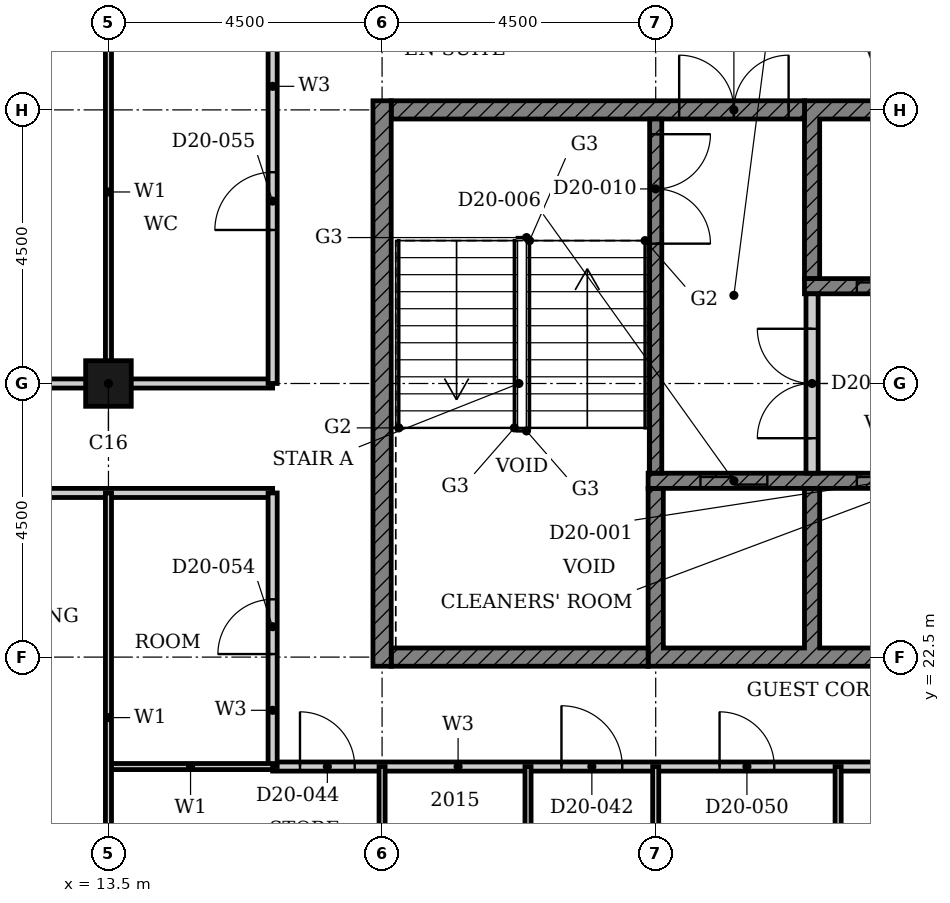
"""IFC4 building model, lengths in metres.
Left out: names, types, materials, properties, quantities, classifications, styles, units other than length and angle.
Written with IfcOpenShell. Run it as: python <this file> out.ifc"""

import sys

from ifc_helpers import new_model, si_unit, direction, frame, frame_2d, origin, origin_2d, place, context, subcontext, project, spatial, polyline, rectangle, hollow_rectangle, outline, extrude, element, fill, save


model = new_model("IFC4")
c1 = context("Model", 3, precision=1e-05, world=origin(), true_north=direction((0.0, 1.0)))
c2 = subcontext(c1, "Body", "Model", "MODEL_VIEW")
j1 = project(units=[si_unit("LENGTHUNIT", "METRE"), si_unit("PLANEANGLEUNIT", "RADIAN")], contexts=[c1])
p1 = place(None, origin())
s1 = spatial("IfcSite", under=j1, at=p1, CompositionType="ELEMENT")
p2 = place(p1, origin())
s2 = spatial("IfcBuilding", under=s1, at=p2, CompositionType="ELEMENT")
p3 = place(p2, frame((0.0, 0.0, 85.2)))
s3 = spatial("IfcBuildingStorey", under=s2, at=p3, CompositionType="ELEMENT", Elevation=85.2)
p4 = place(p3, frame((13.5, 27.0, 0.0), z_axis=(0.0, 0.0, 1.0), x_axis=(1.0, 0.0, 0.0)))
e1 = element("IfcColumn", 1, at=p4, inside=s3, PredefinedType="COLUMN", context=c2, shape_type="SweptSolid", body=[
    extrude(hollow_rectangle(XDim=0.75, YDim=0.75, WallThickness=0.024, at=origin_2d()), origin(), (0.0, 0.0, 1.0), 3.6),
])
p5 = place(p3, origin())
e2 = element("IfcWall", 2, at=p5, inside=s3, PredefinedType="SHEAR", context=c2, shape_type="SweptSolid", body=[
    extrude(outline(polyline([(22.375, 22.35), (38.053, 22.35), (38.053, 25.275), (37.803, 25.275), (37.803, 22.65), (35.482, 22.65), (35.482, 25.275), (35.232, 25.275), (35.232, 22.65), (32.911, 22.65), (32.911, 25.275), (32.661, 25.275), (32.661, 22.65), (30.339, 22.65), (30.339, 25.275), (30.089, 25.275), (30.089, 22.65), (27.768, 22.65), (27.768, 25.275), (27.518, 25.275), (27.518, 22.65), (25.197, 22.65), (25.197, 25.275), (24.947, 25.275), (24.947, 22.65), (22.625, 22.65), (22.625, 25.275), (22.375, 25.275), (22.375, 22.35)])), origin(), (0.0, 0.0, 1.0), 3.3),
])
p6 = place(p3, origin())
e3 = element("IfcWall", 3, at=p6, inside=s3, PredefinedType="SHEAR", context=c2, shape_type="SweptSolid", body=[
    extrude(outline(polyline([(24.947, 28.725), (25.197, 28.725), (25.197, 31.35), (27.518, 31.35), (27.518, 28.725), (27.768, 28.725), (27.768, 31.35), (30.089, 31.35), (30.089, 28.725), (30.339, 28.725), (30.339, 31.35), (32.661, 31.35), (32.661, 28.725), (32.911, 28.725), (32.911, 31.35), (35.232, 31.35), (35.232, 28.725), (35.482, 28.725), (35.482, 31.35), (37.803, 31.35), (37.803, 28.725), (38.053, 28.725), (38.053, 31.35), (40.375, 31.35), (40.375, 28.725), (40.625, 28.725), (40.625, 31.65), (24.947, 31.65), (24.947, 28.725)])), origin(), (0.0, 0.0, 1.0), 3.3),
])
p7 = place(p3, frame((18.15, 22.5, 0.0), z_axis=(0.0, 0.0, 1.0), x_axis=(1.0, 0.0, 0.0)))
e4 = element("IfcWall", 4, at=p7, inside=s3, PredefinedType="SHEAR", context=c2, shape_type="SweptSolid", body=[
    extrude(rectangle(XDim=4.225, YDim=0.3, at=frame_2d((2.113, 0.0))), origin(), (0.0, 0.0, 1.0), 3.3),
])
p8 = place(p3, frame((18.15, 31.5, 0.0), z_axis=(0.0, 0.0, 1.0), x_axis=(1.0, 0.0, 0.0)))
e5 = element("IfcWall", 5, at=p8, inside=s3, PredefinedType="SHEAR", context=c2, shape_type="SweptSolid", body=[
    extrude(rectangle(XDim=6.797, YDim=0.3, at=frame_2d((3.398, 0.0))), origin(), (0.0, 0.0, 1.0), 3.3),
])
p9 = place(p8, frame((4.736, 0.0, 0.0)))
e6 = element("IfcOpeningElement", 6, at=p9, cuts=e5, PredefinedType="OPENING", context=c2, shape_type="SweptSolid", body=[
    extrude(rectangle(XDim=1.8, YDim=2.1, at=frame_2d((0.9, 1.05))), frame((0.0, 0.16, 0.0), z_axis=(0.0, -1.0, 0.0), x_axis=(1.0, 0.0, 0.0)), (0.0, 0.0, 1.0), 0.32),
])
p10 = place(p3, frame((18.0, 22.35, 0.0), z_axis=(0.0, 0.0, 1.0), x_axis=(0.0, 1.0, 0.0)))
e7 = element("IfcWall", 7, at=p10, inside=s3, PredefinedType="SHEAR", context=c2, shape_type="SweptSolid", body=[
    extrude(rectangle(XDim=9.3, YDim=0.3, at=frame_2d((4.65, 0.0))), origin(), (0.0, 0.0, 1.0), 3.3),
])
p11 = place(p3, frame((22.375, 25.4, 0.0), z_axis=(0.0, 0.0, 1.0), x_axis=(1.0, 0.0, 0.0)))
e8 = element("IfcWall", 8, at=p11, inside=s3, PredefinedType="SHEAR", context=c2, shape_type="SweptSolid", body=[
    extrude(rectangle(XDim=15.678, YDim=0.25, at=frame_2d((7.839, 0.0))), origin(), (0.0, 0.0, 1.0), 3.3),
])
p12 = place(p11, frame((3.432, 0.0, 0.0)))
e9 = element("IfcOpeningElement", 9, at=p12, cuts=e8, PredefinedType="OPENING", context=c2, shape_type="SweptSolid", body=[
    extrude(rectangle(XDim=1.1, YDim=2.1, at=frame_2d((0.55, 1.05))), frame((0.0, 0.135, 0.0), z_axis=(0.0, -1.0, 0.0), x_axis=(1.0, 0.0, 0.0)), (0.0, 0.0, 1.0), 0.27),
])
p13 = place(p11, frame((11.146, 0.0, 0.0)))
e10 = element("IfcOpeningElement", 10, at=p13, cuts=e8, PredefinedType="OPENING", context=c2, shape_type="SweptSolid", body=[
    extrude(rectangle(XDim=1.1, YDim=2.1, at=frame_2d((0.55, 1.05))), frame((0.0, 0.135, 0.0), z_axis=(0.0, -1.0, 0.0), x_axis=(1.0, 0.0, 0.0)), (0.0, 0.0, 1.0), 0.27),
])
p14 = place(p11, frame((13.718, 0.0, 0.0)))
e11 = element("IfcOpeningElement", 11, at=p14, cuts=e8, PredefinedType="OPENING", context=c2, shape_type="SweptSolid", body=[
    extrude(rectangle(XDim=1.1, YDim=2.1, at=frame_2d((0.55, 1.05))), frame((0.0, 0.135, 0.0), z_axis=(0.0, -1.0, 0.0), x_axis=(1.0, 0.0, 0.0)), (0.0, 0.0, 1.0), 0.27),
])
p15 = place(p11, frame((0.861, 0.0, 0.0)))
e12 = element("IfcOpeningElement", 12, at=p15, cuts=e8, PredefinedType="OPENING", context=c2, shape_type="SweptSolid", body=[
    extrude(rectangle(XDim=1.1, YDim=2.1, at=frame_2d((0.55, 1.05))), frame((0.0, 0.135, 0.0), z_axis=(0.0, -1.0, 0.0), x_axis=(1.0, 0.0, 0.0)), (0.0, 0.0, 1.0), 0.27),
])
p16 = place(p3, frame((24.947, 28.6, 0.0), z_axis=(0.0, 0.0, 1.0), x_axis=(1.0, 0.0, 0.0)))
e13 = element("IfcWall", 13, at=p16, inside=s3, PredefinedType="SHEAR", context=c2, shape_type="SweptSolid", body=[
    extrude(rectangle(XDim=15.678, YDim=0.25, at=frame_2d((7.839, 0.0))), origin(), (0.0, 0.0, 1.0), 3.3),
])
p17 = place(p16, frame((0.861, 0.0, 0.0)))
e14 = element("IfcOpeningElement", 14, at=p17, cuts=e13, PredefinedType="OPENING", context=c2, shape_type="SweptSolid", body=[
    extrude(rectangle(XDim=1.1, YDim=2.1, at=frame_2d((0.55, 1.05))), frame((0.0, 0.135, 0.0), z_axis=(0.0, -1.0, 0.0), x_axis=(1.0, 0.0, 0.0)), (0.0, 0.0, 1.0), 0.27),
])
p18 = place(p16, frame((8.575, 0.0, 0.0)))
e15 = element("IfcOpeningElement", 15, at=p18, cuts=e13, PredefinedType="OPENING", context=c2, shape_type="SweptSolid", body=[
    extrude(rectangle(XDim=1.1, YDim=2.1, at=frame_2d((0.55, 1.05))), frame((0.0, 0.135, 0.0), z_axis=(0.0, -1.0, 0.0), x_axis=(1.0, 0.0, 0.0)), (0.0, 0.0, 1.0), 0.27),
])
p19 = place(p16, frame((13.718, 0.0, 0.0)))
e16 = element("IfcOpeningElement", 16, at=p19, cuts=e13, PredefinedType="OPENING", context=c2, shape_type="SweptSolid", body=[
    extrude(rectangle(XDim=1.1, YDim=2.1, at=frame_2d((0.55, 1.05))), frame((0.0, 0.135, 0.0), z_axis=(0.0, -1.0, 0.0), x_axis=(1.0, 0.0, 0.0)), (0.0, 0.0, 1.0), 0.27),
])
p20 = place(p3, frame((22.5, 31.35, 0.0), z_axis=(0.0, 0.0, 1.0), x_axis=(0.0, -1.0, 0.0)))
e17 = element("IfcWall", 17, at=p20, inside=s3, PredefinedType="SHEAR", context=c2, shape_type="SweptSolid", body=[
    extrude(rectangle(XDim=5.825, YDim=0.2, at=frame_2d((2.913, 0.0))), origin(), (0.0, 0.0, 1.0), 3.3),
])
p21 = place(p20, frame((0.25, 0.0, 0.0)))
e18 = element("IfcOpeningElement", 18, at=p21, cuts=e17, PredefinedType="OPENING", context=c2, shape_type="SweptSolid", body=[
    extrude(rectangle(XDim=1.8, YDim=2.1, at=frame_2d((0.9, 1.05))), frame((0.0, 0.11, 0.0), z_axis=(0.0, -1.0, 0.0), x_axis=(1.0, 0.0, 0.0)), (0.0, 0.0, 1.0), 0.22),
])
p22 = place(p3, frame((25.072, 25.525, 0.0), z_axis=(0.0, 0.0, 1.0), x_axis=(0.0, 1.0, 0.0)))
e19 = element("IfcWall", 19, at=p22, inside=s3, PredefinedType="PARTITIONING", context=c2, shape_type="SweptSolid", body=[
    extrude(rectangle(XDim=2.95, YDim=0.2, at=frame_2d((1.475, 0.0))), origin(), (0.0, 0.0, 1.0), 3.3),
])
p23 = place(p22, frame((0.575, 0.0, 0.0)))
e20 = element("IfcOpeningElement", 20, at=p23, cuts=e19, PredefinedType="OPENING", context=c2, shape_type="SweptSolid", body=[
    extrude(rectangle(XDim=1.8, YDim=2.1, at=frame_2d((0.9, 1.05))), frame((0.0, 0.11, 0.0), z_axis=(0.0, -1.0, 0.0), x_axis=(1.0, 0.0, 0.0)), (0.0, 0.0, 1.0), 0.22),
])
p24 = place(p3, frame((16.2, 20.7, 0.0), z_axis=(0.0, 0.0, 1.0), x_axis=(1.0, 0.0, 0.0)))
e21 = element("IfcWall", 21, at=p24, inside=s3, PredefinedType="PARTITIONING", context=c2, shape_type="SweptSolid", body=[
    extrude(rectangle(XDim=13.5, YDim=0.15, at=frame_2d((6.75, 0.0))), origin(), (0.0, 0.0, 1.0), 3.3),
])
p25 = place(p24, frame((4.75, 0.0, 0.0)))
e22 = element("IfcOpeningElement", 22, at=p25, cuts=e21, PredefinedType="OPENING", context=c2, shape_type="SweptSolid", body=[
    extrude(rectangle(XDim=1.0, YDim=2.1, at=frame_2d((0.5, 1.05))), frame((0.0, 0.085, 0.0), z_axis=(0.0, -1.0, 0.0), x_axis=(1.0, 0.0, 0.0)), (0.0, 0.0, 1.0), 0.17),
])
p26 = place(p24, frame((0.45, 0.0, 0.0)))
e23 = element("IfcOpeningElement", 23, at=p26, cuts=e21, PredefinedType="OPENING", context=c2, shape_type="SweptSolid", body=[
    extrude(rectangle(XDim=0.9, YDim=2.1, at=frame_2d((0.45, 1.05))), frame((0.0, 0.085, 0.0), z_axis=(0.0, -1.0, 0.0), x_axis=(1.0, 0.0, 0.0)), (0.0, 0.0, 1.0), 0.17),
])
p27 = place(p24, frame((7.35, 0.0, 0.0)))
e24 = element("IfcOpeningElement", 24, at=p27, cuts=e21, PredefinedType="OPENING", context=c2, shape_type="SweptSolid", body=[
    extrude(rectangle(XDim=0.9, YDim=2.1, at=frame_2d((0.45, 1.05))), frame((0.0, 0.085, 0.0), z_axis=(0.0, -1.0, 0.0), x_axis=(1.0, 0.0, 0.0)), (0.0, 0.0, 1.0), 0.17),
])
p28 = place(p24, frame((10.95, 0.0, 0.0)))
e25 = element("IfcOpeningElement", 25, at=p28, cuts=e21, PredefinedType="OPENING", context=c2, shape_type="SweptSolid", body=[
    extrude(rectangle(XDim=0.9, YDim=2.1, at=frame_2d((0.45, 1.05))), frame((0.0, 0.085, 0.0), z_axis=(0.0, -1.0, 0.0), x_axis=(1.0, 0.0, 0.0)), (0.0, 0.0, 1.0), 0.17),
])
p29 = place(p3, frame((4.5, 25.2, 0.0), z_axis=(0.0, 0.0, 1.0), x_axis=(1.0, 0.0, 0.0)))
e26 = element("IfcWall", 26, at=p29, inside=s3, PredefinedType="PARTITIONING", context=c2, shape_type="SweptSolid", body=[
    extrude(rectangle(XDim=11.7, YDim=0.15, at=frame_2d((5.85, 0.0))), origin(), (0.0, 0.0, 1.0), 3.3),
])
p30 = place(p29, frame((6.25, 0.0, 0.0)))
e27 = element("IfcOpeningElement", 27, at=p30, cuts=e26, PredefinedType="OPENING", context=c2, shape_type="SweptSolid", body=[
    extrude(rectangle(XDim=1.0, YDim=2.1, at=frame_2d((0.5, 1.05))), frame((0.0, 0.085, 0.0), z_axis=(0.0, -1.0, 0.0), x_axis=(1.0, 0.0, 0.0)), (0.0, 0.0, 1.0), 0.17),
])
p31 = place(p3, frame((4.5, 27.0, 0.0), z_axis=(0.0, 0.0, 1.0), x_axis=(1.0, 0.0, 0.0)))
e28 = element("IfcWall", 28, at=p31, inside=s3, PredefinedType="PARTITIONING", context=c2, shape_type="SweptSolid", body=[
    extrude(rectangle(XDim=11.7, YDim=0.15, at=frame_2d((5.85, 0.0))), origin(), (0.0, 0.0, 1.0), 2.58),
])
p32 = place(p31, frame((6.25, 0.0, 0.0)))
e29 = element("IfcOpeningElement", 29, at=p32, cuts=e28, PredefinedType="OPENING", context=c2, shape_type="SweptSolid", body=[
    extrude(rectangle(XDim=1.0, YDim=2.1, at=frame_2d((0.5, 1.05))), frame((0.0, 0.085, 0.0), z_axis=(0.0, -1.0, 0.0), x_axis=(1.0, 0.0, 0.0)), (0.0, 0.0, 1.0), 0.17),
])
p33 = place(p3, frame((16.2, 27.0, 0.0), z_axis=(0.0, 0.0, 1.0), x_axis=(0.0, 1.0, 0.0)))
e30 = element("IfcWall", 30, at=p33, inside=s3, PredefinedType="PARTITIONING", context=c2, shape_type="SweptSolid", body=[
    extrude(rectangle(XDim=6.3, YDim=0.15, at=frame_2d((3.15, 0.0))), origin(), (0.0, 0.0, 1.0), 3.3),
])
p34 = place(p33, frame((2.525, 0.0, 0.0)))
e31 = element("IfcOpeningElement", 31, at=p34, cuts=e30, PredefinedType="OPENING", context=c2, shape_type="SweptSolid", body=[
    extrude(rectangle(XDim=0.95, YDim=2.1, at=frame_2d((0.475, 1.05))), frame((0.0, 0.085, 0.0), z_axis=(0.0, -1.0, 0.0), x_axis=(1.0, 0.0, 0.0)), (0.0, 0.0, 1.0), 0.17),
])
p35 = place(p3, frame((16.2, 20.7, 0.0), z_axis=(0.0, 0.0, 1.0), x_axis=(0.0, 1.0, 0.0)))
e32 = element("IfcWall", 32, at=p35, inside=s3, PredefinedType="PARTITIONING", context=c2, shape_type="SweptSolid", body=[
    extrude(rectangle(XDim=4.5, YDim=0.15, at=frame_2d((2.25, 0.0))), origin(), (0.0, 0.0, 1.0), 3.3),
])
p36 = place(p35, frame((1.85, 0.0, 0.0)))
e33 = element("IfcOpeningElement", 33, at=p36, cuts=e32, PredefinedType="OPENING", context=c2, shape_type="SweptSolid", body=[
    extrude(rectangle(XDim=0.9, YDim=2.1, at=frame_2d((0.45, 1.05))), frame((0.0, 0.085, 0.0), z_axis=(0.0, -1.0, 0.0), x_axis=(1.0, 0.0, 0.0)), (0.0, 0.0, 1.0), 0.17),
])
p37 = place(p3, frame((13.5, 20.7, 0.0), z_axis=(0.0, 0.0, 1.0), x_axis=(1.0, 0.0, 0.0)))
e34 = element("IfcWall", 34, at=p37, inside=s3, PredefinedType="PARTITIONING", context=c2, shape_type="SweptSolid", body=[
    extrude(rectangle(XDim=2.7, YDim=0.1, at=frame_2d((1.35, 0.0))), origin(), (0.0, 0.0, 1.0), 3.3),
])
p38 = place(p3, frame((13.5, 27.0, 0.0), z_axis=(0.0, 0.0, 1.0), x_axis=(0.0, 1.0, 0.0)))
e35 = element("IfcWall", 35, at=p38, inside=s3, PredefinedType="PARTITIONING", context=c2, shape_type="SweptSolid", body=[
    extrude(rectangle(XDim=6.3, YDim=0.1, at=frame_2d((3.15, 0.0))), origin(), (0.0, 0.0, 1.0), 2.38),
])
p39 = place(p3, frame((13.5, 17.81, 0.0), z_axis=(0.0, 0.0, 1.0), x_axis=(0.0, 1.0, 0.0)))
e36 = element("IfcWall", 36, at=p39, inside=s3, PredefinedType="PARTITIONING", context=c2, shape_type="SweptSolid", body=[
    extrude(rectangle(XDim=7.39, YDim=0.1, at=frame_2d((3.695, 0.0))), origin(), (0.0, 0.0, 1.0), 2.38),
])
p40 = place(p3, frame((18.0, 15.56, 0.0), z_axis=(0.0, 0.0, 1.0), x_axis=(0.0, 1.0, 0.0)))
e37 = element("IfcWall", 37, at=p40, inside=s3, PredefinedType="PARTITIONING", context=c2, shape_type="SweptSolid", body=[
    extrude(rectangle(XDim=5.14, YDim=0.1, at=frame_2d((2.57, 0.0))), origin(), (0.0, 0.0, 1.0), 3.3),
])
p41 = place(p3, frame((22.5, 13.31, 0.0), z_axis=(0.0, 0.0, 1.0), x_axis=(0.0, 1.0, 0.0)))
e38 = element("IfcWall", 38, at=p41, inside=s3, PredefinedType="PARTITIONING", context=c2, shape_type="SweptSolid", body=[
    extrude(rectangle(XDim=7.39, YDim=0.1, at=frame_2d((3.695, 0.0))), origin(), (0.0, 0.0, 1.0), 3.3),
])
p42 = place(p3, frame((25.5, 13.5, 0.0), z_axis=(0.0, 0.0, 1.0), x_axis=(0.0, 1.0, 0.0)))
e39 = element("IfcWall", 39, at=p42, inside=s3, PredefinedType="PARTITIONING", context=c2, shape_type="SweptSolid", body=[
    extrude(rectangle(XDim=7.2, YDim=0.1, at=frame_2d((3.6, 0.0))), origin(), (0.0, 0.0, 1.0), 3.3),
])
p43 = place(p3, frame((20.4, 18.0, 0.0), z_axis=(0.0, 0.0, 1.0), x_axis=(0.0, 1.0, 0.0)))
e40 = element("IfcWall", 40, at=p43, inside=s3, PredefinedType="PARTITIONING", context=c2, shape_type="SweptSolid", body=[
    extrude(rectangle(XDim=2.7, YDim=0.1, at=frame_2d((1.35, 0.0))), origin(), (0.0, 0.0, 1.0), 3.3),
])
p44 = place(p12, origin())
e41 = element("IfcDoor", 41, at=p44, inside=s3, OperationType="DOUBLE_DOOR_SLIDING", PredefinedType="DOOR", context=c2, shape_type="SweptSolid", body=[
    extrude(rectangle(XDim=1.1, YDim=2.1, at=frame_2d((0.55, 1.05))), frame((0.0, 0.025, 0.0), z_axis=(0.0, -1.0, 0.0), x_axis=(1.0, 0.0, 0.0)), (0.0, 0.0, 1.0), 0.05),
])
fill(e9, e41)
p45 = place(p17, origin())
e42 = element("IfcDoor", 42, at=p45, inside=s3, OperationType="DOUBLE_DOOR_SLIDING", PredefinedType="DOOR", context=c2, shape_type="SweptSolid", body=[
    extrude(rectangle(XDim=1.1, YDim=2.1, at=frame_2d((0.55, 1.05))), frame((0.0, 0.025, 0.0), z_axis=(0.0, -1.0, 0.0), x_axis=(1.0, 0.0, 0.0)), (0.0, 0.0, 1.0), 0.05),
])
fill(e14, e42)
p46 = place(p15, origin())
e43 = element("IfcDoor", 43, at=p46, inside=s3, OperationType="DOUBLE_DOOR_SLIDING", PredefinedType="DOOR", context=c2, shape_type="SweptSolid", body=[
    extrude(rectangle(XDim=1.1, YDim=2.1, at=frame_2d((0.55, 1.05))), frame((0.0, 0.025, 0.0), z_axis=(0.0, -1.0, 0.0), x_axis=(1.0, 0.0, 0.0)), (0.0, 0.0, 1.0), 0.05),
])
fill(e12, e43)
p47 = place(p21, origin())
e44 = element("IfcDoor", 44, at=p47, inside=s3, OperationType="DOUBLE_DOOR_SINGLE_SWING", PredefinedType="DOOR", context=c2, shape_type="SweptSolid", body=[
    extrude(rectangle(XDim=1.8, YDim=2.1, at=frame_2d((0.9, 1.05))), frame((0.0, 0.025, 0.0), z_axis=(0.0, -1.0, 0.0), x_axis=(1.0, 0.0, 0.0)), (0.0, 0.0, 1.0), 0.05),
])
fill(e18, e44)
p48 = place(p23, origin())
e45 = element("IfcDoor", 45, at=p48, inside=s3, OperationType="DOUBLE_DOOR_SINGLE_SWING", PredefinedType="DOOR", context=c2, shape_type="SweptSolid", body=[
    extrude(rectangle(XDim=1.8, YDim=2.1, at=frame_2d((0.9, 1.05))), frame((0.0, 0.025, 0.0), z_axis=(0.0, -1.0, 0.0), x_axis=(1.0, 0.0, 0.0)), (0.0, 0.0, 1.0), 0.05),
])
fill(e20, e45)
p49 = place(p9, origin())
e46 = element("IfcDoor", 46, at=p49, inside=s3, OperationType="DOUBLE_DOOR_SINGLE_SWING", PredefinedType="DOOR", context=c2, shape_type="SweptSolid", body=[
    extrude(rectangle(XDim=1.8, YDim=2.1, at=frame_2d((0.9, 1.05))), frame((0.0, 0.025, 0.0), z_axis=(0.0, -1.0, 0.0), x_axis=(1.0, 0.0, 0.0)), (0.0, 0.0, 1.0), 0.05),
])
fill(e6, e46)
p50 = place(p25, origin())
e47 = element("IfcDoor", 47, at=p50, inside=s3, OperationType="SINGLE_SWING_RIGHT", PredefinedType="DOOR", context=c2, shape_type="SweptSolid", body=[
    extrude(rectangle(XDim=1.0, YDim=2.1, at=frame_2d((0.5, 1.05))), frame((0.0, 0.025, 0.0), z_axis=(0.0, -1.0, 0.0), x_axis=(1.0, 0.0, 0.0)), (0.0, 0.0, 1.0), 0.05),
])
fill(e22, e47)
p51 = place(p26, origin())
e48 = element("IfcDoor", 48, at=p51, inside=s3, OperationType="SINGLE_SWING_RIGHT", PredefinedType="DOOR", context=c2, shape_type="SweptSolid", body=[
    extrude(rectangle(XDim=0.9, YDim=2.1, at=frame_2d((0.45, 1.05))), frame((0.0, 0.025, 0.0), z_axis=(0.0, -1.0, 0.0), x_axis=(1.0, 0.0, 0.0)), (0.0, 0.0, 1.0), 0.05),
])
fill(e23, e48)
p52 = place(p27, origin())
e49 = element("IfcDoor", 49, at=p52, inside=s3, OperationType="SINGLE_SWING_RIGHT", PredefinedType="DOOR", context=c2, shape_type="SweptSolid", body=[
    extrude(rectangle(XDim=0.9, YDim=2.1, at=frame_2d((0.45, 1.05))), frame((0.0, 0.025, 0.0), z_axis=(0.0, -1.0, 0.0), x_axis=(1.0, 0.0, 0.0)), (0.0, 0.0, 1.0), 0.05),
])
fill(e24, e49)
p53 = place(p36, origin())
e50 = element("IfcDoor", 50, at=p53, inside=s3, OperationType="SINGLE_SWING_RIGHT", PredefinedType="DOOR", context=c2, shape_type="SweptSolid", body=[
    extrude(rectangle(XDim=0.9, YDim=2.1, at=frame_2d((0.45, 1.05))), frame((0.0, 0.025, 0.0), z_axis=(0.0, -1.0, 0.0), x_axis=(1.0, 0.0, 0.0)), (0.0, 0.0, 1.0), 0.05),
])
fill(e33, e50)
p54 = place(p34, origin())
e51 = element("IfcDoor", 51, at=p54, inside=s3, OperationType="SINGLE_SWING_LEFT", PredefinedType="DOOR", context=c2, shape_type="SweptSolid", body=[
    extrude(rectangle(XDim=0.95, YDim=2.1, at=frame_2d((0.475, 1.05))), frame((0.0, 0.025, 0.0), z_axis=(0.0, -1.0, 0.0), x_axis=(1.0, 0.0, 0.0)), (0.0, 0.0, 1.0), 0.05),
])
fill(e31, e51)
save(model, sys.argv[1])
